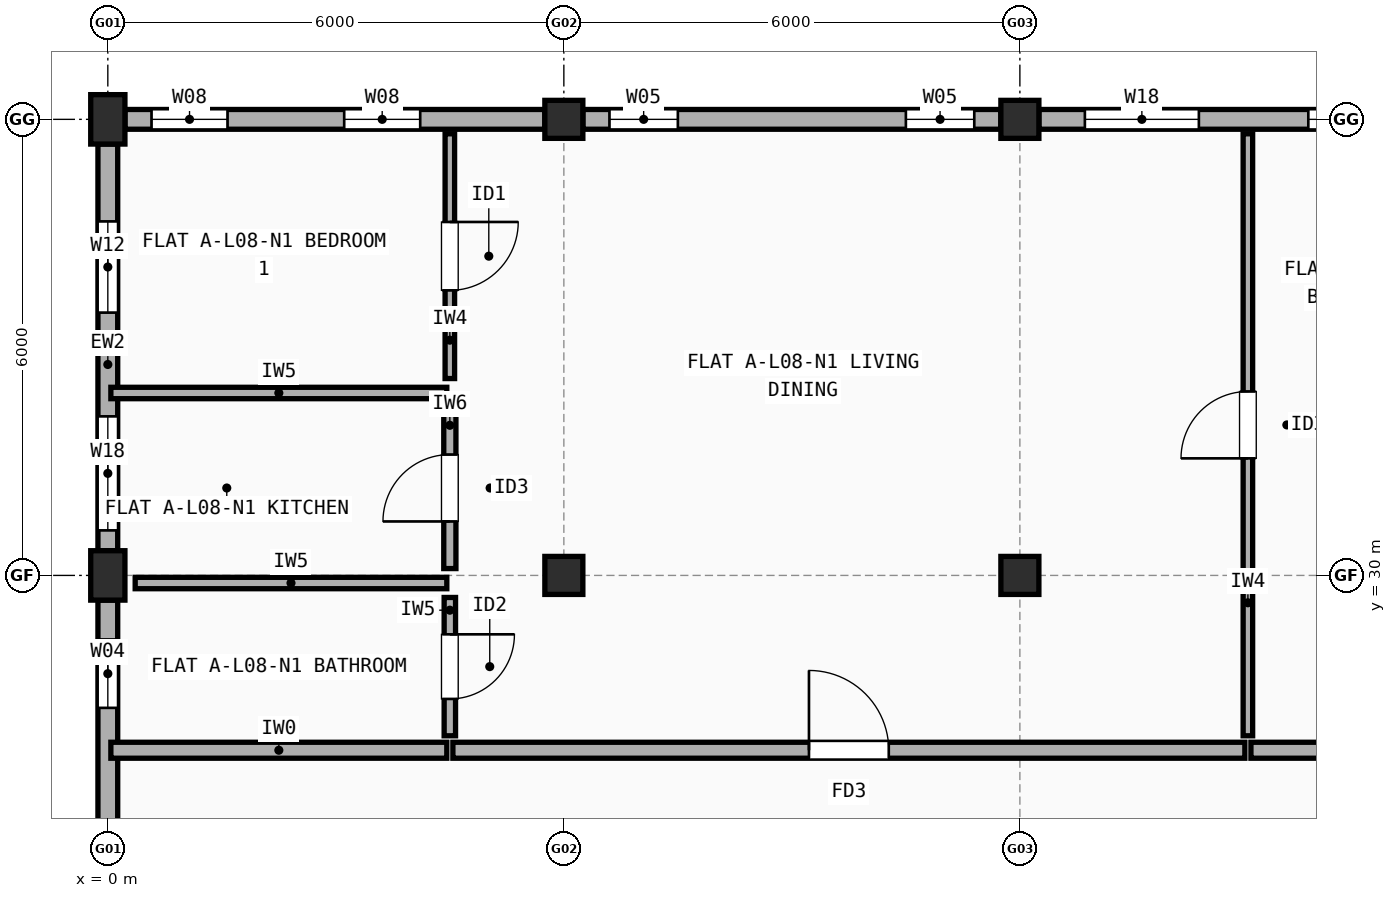
"""IFC4 building model, lengths in metres.
Left out: names, types, materials, properties, quantities, classifications, styles, units other than length and angle.
Written with IfcOpenShell. Run it as: python <this file> out.ifc"""

import sys

from ifc_helpers import new_model, si_unit, direction, frame, frame_2d, origin, origin_2d, place, context, subcontext, project, spatial, rectangle, extrude, element, fill, save


model = new_model("IFC4")
c1 = context("Model", 3, precision=1e-05, world=origin(), true_north=direction((0.0, 1.0)))
c2 = subcontext(c1, "Body", "Model", "MODEL_VIEW")
j1 = project(units=[si_unit("LENGTHUNIT", "METRE"), si_unit("PLANEANGLEUNIT", "RADIAN")], contexts=[c1])
p1 = place(None, origin())
s1 = spatial("IfcSite", under=j1, at=p1, CompositionType="ELEMENT")
p2 = place(p1, origin())
s2 = spatial("IfcBuilding", under=s1, at=p2, CompositionType="ELEMENT")
p3 = place(p2, frame((0.0, 0.0, 26.9)))
s3 = spatial("IfcBuildingStorey", under=s2, at=p3, CompositionType="ELEMENT", Elevation=26.9)
for number, where, z_axis, x_axis in (
    (1, (0.0, 30.0, 0.0), (0.0, 0.0, 1.0), (1.0, 0.0, 0.0)),
    (2, (0.0, 36.0, 0.0), (0.0, 0.0, 1.0), (1.0, 0.0, 0.0)),
):
    element("IfcColumn", number, at=place(p3, frame(where, z_axis=z_axis, x_axis=x_axis)), inside=s3, PredefinedType="COLUMN", context=c2, shape_type="SweptSolid", body=[
        extrude(rectangle(XDim=0.45, YDim=0.65, at=origin_2d()), origin(), (0.0, 0.0, 1.0), 2.98),
    ])
for number, where, z_axis, x_axis in (
    (3, (6.0, 30.0, 0.0), (0.0, 0.0, 1.0), (1.0, 0.0, 0.0)),
    (4, (6.0, 36.0, 0.0), (0.0, 0.0, 1.0), (1.0, 0.0, 0.0)),
    (5, (12.0, 30.0, 0.0), (0.0, 0.0, 1.0), (1.0, 0.0, 0.0)),
    (6, (12.0, 36.0, 0.0), (0.0, 0.0, 1.0), (1.0, 0.0, 0.0)),
):
    element("IfcColumn", number, at=place(p3, frame(where, z_axis=z_axis, x_axis=x_axis)), inside=s3, PredefinedType="COLUMN", context=c2, shape_type="SweptSolid", body=[
        extrude(rectangle(XDim=0.5, YDim=0.5, at=origin_2d()), origin(), (0.0, 0.0, 1.0), 2.98),
    ])
p4 = place(p3, frame((17.75, 36.0, 0.0), z_axis=(0.0, 0.0, 1.0), x_axis=(-1.0, 0.0, 0.0)))
e7 = element("IfcWall", 7, at=p4, inside=s3, PredefinedType="STANDARD", context=c2, shape_type="SweptSolid", body=[
    extrude(rectangle(XDim=5.5, YDim=0.26, at=frame_2d((2.75, 0.0))), origin(), (0.0, 0.0, 1.0), 2.462),
])
p5 = place(p4, frame((0.755, 0.0, 0.9)))
e8 = element("IfcOpeningElement", 8, at=p5, cuts=e7, PredefinedType="OPENING", context=c2, shape_type="SweptSolid", body=[
    extrude(rectangle(XDim=1.2, YDim=1.35, at=frame_2d((0.6, 0.675))), frame((0.0, 0.14, 0.0), z_axis=(0.0, -1.0, 0.0), x_axis=(1.0, 0.0, 0.0)), (0.0, 0.0, 1.0), 0.28),
])
p6 = place(p4, frame((3.395, 0.0, 0.9)))
e9 = element("IfcOpeningElement", 9, at=p6, cuts=e7, PredefinedType="OPENING", context=c2, shape_type="SweptSolid", body=[
    extrude(rectangle(XDim=1.5, YDim=1.4, at=frame_2d((0.75, 0.7))), frame((0.0, 0.14, 0.0), z_axis=(0.0, -1.0, 0.0), x_axis=(1.0, 0.0, 0.0)), (0.0, 0.0, 1.0), 0.28),
])
p7 = place(p3, frame((11.75, 36.0, 0.0), z_axis=(0.0, 0.0, 1.0), x_axis=(-1.0, 0.0, 0.0)))
e10 = element("IfcWall", 10, at=p7, inside=s3, PredefinedType="STANDARD", context=c2, shape_type="SweptSolid", body=[
    extrude(rectangle(XDim=5.5, YDim=0.26, at=frame_2d((2.75, 0.0))), origin(), (0.0, 0.0, 1.0), 2.462),
])
p8 = place(p7, frame((0.35, 0.0, 0.9)))
e11 = element("IfcOpeningElement", 11, at=p8, cuts=e10, PredefinedType="OPENING", context=c2, shape_type="SweptSolid", body=[
    extrude(rectangle(XDim=0.9, YDim=1.4, at=frame_2d((0.45, 0.7))), frame((0.0, 0.14, 0.0), z_axis=(0.0, -1.0, 0.0), x_axis=(1.0, 0.0, 0.0)), (0.0, 0.0, 1.0), 0.28),
])
p9 = place(p7, frame((4.25, 0.0, 0.9)))
e12 = element("IfcOpeningElement", 12, at=p9, cuts=e10, PredefinedType="OPENING", context=c2, shape_type="SweptSolid", body=[
    extrude(rectangle(XDim=0.9, YDim=1.4, at=frame_2d((0.45, 0.7))), frame((0.0, 0.14, 0.0), z_axis=(0.0, -1.0, 0.0), x_axis=(1.0, 0.0, 0.0)), (0.0, 0.0, 1.0), 0.28),
])
p10 = place(p3, frame((5.75, 36.0, 0.0), z_axis=(0.0, 0.0, 1.0), x_axis=(-1.0, 0.0, 0.0)))
e13 = element("IfcWall", 13, at=p10, inside=s3, PredefinedType="STANDARD", context=c2, shape_type="SweptSolid", body=[
    extrude(rectangle(XDim=5.525, YDim=0.26, at=frame_2d((2.762, 0.0))), origin(), (0.0, 0.0, 1.0), 2.462),
])
p11 = place(p10, frame((1.64, 0.0, 0.9)))
e14 = element("IfcOpeningElement", 14, at=p11, cuts=e13, PredefinedType="OPENING", context=c2, shape_type="SweptSolid", body=[
    extrude(rectangle(XDim=1.0, YDim=1.4, at=frame_2d((0.5, 0.7))), frame((0.0, 0.14, 0.0), z_axis=(0.0, -1.0, 0.0), x_axis=(1.0, 0.0, 0.0)), (0.0, 0.0, 1.0), 0.28),
])
p12 = place(p10, frame((4.175, 0.0, 0.9)))
e15 = element("IfcOpeningElement", 15, at=p12, cuts=e13, PredefinedType="OPENING", context=c2, shape_type="SweptSolid", body=[
    extrude(rectangle(XDim=1.0, YDim=1.4, at=frame_2d((0.5, 0.7))), frame((0.0, 0.14, 0.0), z_axis=(0.0, -1.0, 0.0), x_axis=(1.0, 0.0, 0.0)), (0.0, 0.0, 1.0), 0.28),
])
p13 = place(p3, frame((0.0, 35.675, 0.0), z_axis=(0.0, 0.0, 1.0), x_axis=(0.0, -1.0, 0.0)))
e16 = element("IfcWall", 16, at=p13, inside=s3, PredefinedType="STANDARD", context=c2, shape_type="SweptSolid", body=[
    extrude(rectangle(XDim=5.35, YDim=0.26, at=frame_2d((2.675, 0.0))), origin(), (0.0, 0.0, 1.0), 2.462),
])
p14 = place(p13, frame((1.018, 0.0, 0.9)))
e17 = element("IfcOpeningElement", 17, at=p14, cuts=e16, PredefinedType="OPENING", context=c2, shape_type="SweptSolid", body=[
    extrude(rectangle(XDim=1.2, YDim=1.35, at=frame_2d((0.6, 0.675))), frame((0.0, 0.14, 0.0), z_axis=(0.0, -1.0, 0.0), x_axis=(1.0, 0.0, 0.0)), (0.0, 0.0, 1.0), 0.28),
])
p15 = place(p13, frame((3.583, 0.0, 0.9)))
e18 = element("IfcOpeningElement", 18, at=p15, cuts=e16, PredefinedType="OPENING", context=c2, shape_type="SweptSolid", body=[
    extrude(rectangle(XDim=1.5, YDim=1.4, at=frame_2d((0.75, 0.7))), frame((0.0, 0.14, 0.0), z_axis=(0.0, -1.0, 0.0), x_axis=(1.0, 0.0, 0.0)), (0.0, 0.0, 1.0), 0.28),
])
p16 = place(p3, frame((0.0, 29.675, 0.0), z_axis=(0.0, 0.0, 1.0), x_axis=(0.0, -1.0, 0.0)))
e19 = element("IfcWall", 19, at=p16, inside=s3, PredefinedType="STANDARD", context=c2, shape_type="SweptSolid", body=[
    extrude(rectangle(XDim=5.35, YDim=0.26, at=frame_2d((2.675, 0.0))), origin(), (0.0, 0.0, 1.0), 2.462),
])
p17 = place(p16, frame((0.518, 0.0, 0.9)))
e20 = element("IfcOpeningElement", 20, at=p17, cuts=e19, PredefinedType="OPENING", context=c2, shape_type="SweptSolid", body=[
    extrude(rectangle(XDim=0.9, YDim=1.3, at=frame_2d((0.45, 0.65))), frame((0.0, 0.14, 0.0), z_axis=(0.0, -1.0, 0.0), x_axis=(1.0, 0.0, 0.0)), (0.0, 0.0, 1.0), 0.28),
])
p18 = place(p16, frame((3.208, 0.0, 0.9)))
e21 = element("IfcOpeningElement", 21, at=p18, cuts=e19, PredefinedType="OPENING", context=c2, shape_type="SweptSolid", body=[
    extrude(rectangle(XDim=0.95, YDim=1.35, at=frame_2d((0.475, 0.675))), frame((0.0, 0.14, 0.0), z_axis=(0.0, -1.0, 0.0), x_axis=(1.0, 0.0, 0.0)), (0.0, 0.0, 1.0), 0.28),
])
p19 = place(p3, frame((0.04, 27.7, 0.0), z_axis=(0.0, 0.0, 1.0), x_axis=(1.0, 0.0, 0.0)))
e22 = element("IfcWall", 22, at=p19, inside=s3, PredefinedType="SOLIDWALL", context=c2, shape_type="SweptSolid", body=[
    extrude(rectangle(XDim=4.42, YDim=0.21, at=frame_2d((2.21, 0.0))), origin(), (0.0, 0.0, 1.0), 2.462),
])
p20 = place(p3, frame((4.54, 27.7, 0.0), z_axis=(0.0, 0.0, 1.0), x_axis=(1.0, 0.0, 0.0)))
e23 = element("IfcWall", 23, at=p20, inside=s3, PredefinedType="SOLIDWALL", context=c2, shape_type="SweptSolid", body=[
    extrude(rectangle(XDim=10.42, YDim=0.21, at=frame_2d((5.21, 0.0))), origin(), (0.0, 0.0, 1.0), 2.508),
])
p21 = place(p20, frame((4.685, 0.0, 0.0)))
e24 = element("IfcOpeningElement", 24, at=p21, cuts=e23, PredefinedType="OPENING", context=c2, shape_type="SweptSolid", body=[
    extrude(rectangle(XDim=1.05, YDim=2.15, at=frame_2d((0.525, 1.075))), frame((0.0, 0.115, 0.0), z_axis=(0.0, -1.0, 0.0), x_axis=(1.0, 0.0, 0.0)), (0.0, 0.0, 1.0), 0.23),
])
p22 = place(p3, frame((4.5, 32.59, 0.0), z_axis=(0.0, 0.0, 1.0), x_axis=(0.0, 1.0, 0.0)))
e25 = element("IfcWall", 25, at=p22, inside=s3, PredefinedType="PARTITIONING", context=c2, shape_type="SweptSolid", body=[
    extrude(rectangle(XDim=3.22, YDim=0.125, at=frame_2d((1.61, 0.0))), origin(), (0.0, 0.0, 1.0), 2.98),
])
p23 = place(p22, frame((1.16, 0.0, 0.0)))
e26 = element("IfcOpeningElement", 26, at=p23, cuts=e25, PredefinedType="OPENING", context=c2, shape_type="SweptSolid", body=[
    extrude(rectangle(XDim=0.9, YDim=2.1, at=frame_2d((0.45, 1.05))), frame((0.0, 0.073, 0.0), z_axis=(0.0, -1.0, 0.0), x_axis=(1.0, 0.0, 0.0)), (0.0, 0.0, 1.0), 0.145),
])
p24 = place(p3, frame((4.5, 30.09, 0.0), z_axis=(0.0, 0.0, 1.0), x_axis=(0.0, 1.0, 0.0)))
e27 = element("IfcWall", 27, at=p24, inside=s3, PredefinedType="PLUMBINGWALL", context=c2, shape_type="SweptSolid", body=[
    extrude(rectangle(XDim=2.12, YDim=0.16, at=frame_2d((1.06, 0.0))), origin(), (0.0, 0.0, 1.0), 2.462),
])
p25 = place(p24, frame((0.62, 0.0, 0.0)))
e28 = element("IfcOpeningElement", 28, at=p25, cuts=e27, PredefinedType="OPENING", context=c2, shape_type="SweptSolid", body=[
    extrude(rectangle(XDim=0.88, YDim=2.1, at=frame_2d((0.44, 1.05))), frame((0.0, 0.09, 0.0), z_axis=(0.0, -1.0, 0.0), x_axis=(1.0, 0.0, 0.0)), (0.0, 0.0, 1.0), 0.18),
])
p26 = place(p3, frame((4.5, 27.89, 0.0), z_axis=(0.0, 0.0, 1.0), x_axis=(0.0, 1.0, 0.0)))
e29 = element("IfcWall", 29, at=p26, inside=s3, PredefinedType="PARTITIONING", context=c2, shape_type="SweptSolid", body=[
    extrude(rectangle(XDim=1.82, YDim=0.15, at=frame_2d((0.91, 0.0))), origin(), (0.0, 0.0, 1.0), 2.98),
])
p27 = place(p26, frame((0.485, 0.0, 0.0)))
e30 = element("IfcOpeningElement", 30, at=p27, cuts=e29, PredefinedType="OPENING", context=c2, shape_type="SweptSolid", body=[
    extrude(rectangle(XDim=0.85, YDim=2.1, at=frame_2d((0.425, 1.05))), frame((0.0, 0.085, 0.0), z_axis=(0.0, -1.0, 0.0), x_axis=(1.0, 0.0, 0.0)), (0.0, 0.0, 1.0), 0.17),
])
p28 = place(p3, frame((0.04, 32.4, 0.0), z_axis=(0.0, 0.0, 1.0), x_axis=(1.0, 0.0, 0.0)))
e31 = element("IfcWall", 31, at=p28, inside=s3, PredefinedType="PARTITIONING", context=c2, shape_type="SweptSolid", body=[
    extrude(rectangle(XDim=4.42, YDim=0.15, at=frame_2d((2.21, 0.0))), origin(), (0.0, 0.0, 1.0), 2.462),
])
p29 = place(p3, frame((0.36, 29.9, 0.0), z_axis=(0.0, 0.0, 1.0), x_axis=(1.0, 0.0, 0.0)))
e32 = element("IfcWall", 32, at=p29, inside=s3, PredefinedType="PARTITIONING", context=c2, shape_type="SweptSolid", body=[
    extrude(rectangle(XDim=4.1, YDim=0.15, at=frame_2d((2.05, 0.0))), origin(), (0.0, 0.0, 1.0), 2.462),
])
p30 = place(p3, frame((15.04, 27.7, 0.0), z_axis=(0.0, 0.0, 1.0), x_axis=(1.0, 0.0, 0.0)))
e33 = element("IfcWall", 33, at=p30, inside=s3, PredefinedType="SOLIDWALL", context=c2, shape_type="SweptSolid", body=[
    extrude(rectangle(XDim=2.92, YDim=0.21, at=frame_2d((1.46, 0.0))), origin(), (0.0, 0.0, 1.0), 2.98),
])
p31 = place(p3, frame((15.0, 27.89, 0.0), z_axis=(0.0, 0.0, 1.0), x_axis=(0.0, 1.0, 0.0)))
e34 = element("IfcWall", 34, at=p31, inside=s3, PredefinedType="PARTITIONING", context=c2, shape_type="SweptSolid", body=[
    extrude(rectangle(XDim=7.92, YDim=0.125, at=frame_2d((3.96, 0.0))), origin(), (0.0, 0.0, 1.0), 2.462),
])
p32 = place(p31, frame((3.65, 0.0, 0.0)))
e35 = element("IfcOpeningElement", 35, at=p32, cuts=e34, PredefinedType="OPENING", context=c2, shape_type="SweptSolid", body=[
    extrude(rectangle(XDim=0.88, YDim=2.1, at=frame_2d((0.44, 1.05))), frame((0.0, 0.073, 0.0), z_axis=(0.0, -1.0, 0.0), x_axis=(1.0, 0.0, 0.0)), (0.0, 0.0, 1.0), 0.145),
])
p33 = place(p5, origin())
e36 = element("IfcWindow", 36, at=p33, inside=s3, PartitioningType="SINGLE_PANEL", PredefinedType="WINDOW", context=c2, shape_type="SweptSolid", body=[
    extrude(rectangle(XDim=1.2, YDim=1.35, at=frame_2d((0.6, 0.675))), frame((0.0, 0.03, 0.0), z_axis=(0.0, -1.0, 0.0), x_axis=(1.0, 0.0, 0.0)), (0.0, 0.0, 1.0), 0.06),
])
fill(e8, e36)
p34 = place(p6, origin())
e37 = element("IfcWindow", 37, at=p34, inside=s3, PartitioningType="SINGLE_PANEL", PredefinedType="WINDOW", context=c2, shape_type="SweptSolid", body=[
    extrude(rectangle(XDim=1.5, YDim=1.4, at=frame_2d((0.75, 0.7))), frame((0.0, 0.03, 0.0), z_axis=(0.0, -1.0, 0.0), x_axis=(1.0, 0.0, 0.0)), (0.0, 0.0, 1.0), 0.06),
])
fill(e9, e37)
p35 = place(p8, origin())
e38 = element("IfcWindow", 38, at=p35, inside=s3, PartitioningType="SINGLE_PANEL", PredefinedType="WINDOW", context=c2, shape_type="SweptSolid", body=[
    extrude(rectangle(XDim=0.9, YDim=1.4, at=frame_2d((0.45, 0.7))), frame((0.0, 0.03, 0.0), z_axis=(0.0, -1.0, 0.0), x_axis=(1.0, 0.0, 0.0)), (0.0, 0.0, 1.0), 0.06),
])
fill(e11, e38)
p36 = place(p9, origin())
e39 = element("IfcWindow", 39, at=p36, inside=s3, PartitioningType="SINGLE_PANEL", PredefinedType="WINDOW", context=c2, shape_type="SweptSolid", body=[
    extrude(rectangle(XDim=0.9, YDim=1.4, at=frame_2d((0.45, 0.7))), frame((0.0, 0.03, 0.0), z_axis=(0.0, -1.0, 0.0), x_axis=(1.0, 0.0, 0.0)), (0.0, 0.0, 1.0), 0.06),
])
fill(e12, e39)
p37 = place(p11, origin())
e40 = element("IfcWindow", 40, at=p37, inside=s3, PartitioningType="SINGLE_PANEL", PredefinedType="WINDOW", context=c2, shape_type="SweptSolid", body=[
    extrude(rectangle(XDim=1.0, YDim=1.4, at=frame_2d((0.5, 0.7))), frame((0.0, 0.03, 0.0), z_axis=(0.0, -1.0, 0.0), x_axis=(1.0, 0.0, 0.0)), (0.0, 0.0, 1.0), 0.06),
])
fill(e14, e40)
p38 = place(p12, origin())
e41 = element("IfcWindow", 41, at=p38, inside=s3, PartitioningType="SINGLE_PANEL", PredefinedType="WINDOW", context=c2, shape_type="SweptSolid", body=[
    extrude(rectangle(XDim=1.0, YDim=1.4, at=frame_2d((0.5, 0.7))), frame((0.0, 0.03, 0.0), z_axis=(0.0, -1.0, 0.0), x_axis=(1.0, 0.0, 0.0)), (0.0, 0.0, 1.0), 0.06),
])
fill(e15, e41)
p39 = place(p14, origin())
e42 = element("IfcWindow", 42, at=p39, inside=s3, PartitioningType="SINGLE_PANEL", PredefinedType="WINDOW", context=c2, shape_type="SweptSolid", body=[
    extrude(rectangle(XDim=1.2, YDim=1.35, at=frame_2d((0.6, 0.675))), frame((0.0, 0.03, 0.0), z_axis=(0.0, -1.0, 0.0), x_axis=(1.0, 0.0, 0.0)), (0.0, 0.0, 1.0), 0.06),
])
fill(e17, e42)
p40 = place(p15, origin())
e43 = element("IfcWindow", 43, at=p40, inside=s3, PartitioningType="SINGLE_PANEL", PredefinedType="WINDOW", context=c2, shape_type="SweptSolid", body=[
    extrude(rectangle(XDim=1.5, YDim=1.4, at=frame_2d((0.75, 0.7))), frame((0.0, 0.03, 0.0), z_axis=(0.0, -1.0, 0.0), x_axis=(1.0, 0.0, 0.0)), (0.0, 0.0, 1.0), 0.06),
])
fill(e18, e43)
p41 = place(p17, origin())
e44 = element("IfcWindow", 44, at=p41, inside=s3, PartitioningType="SINGLE_PANEL", PredefinedType="WINDOW", context=c2, shape_type="SweptSolid", body=[
    extrude(rectangle(XDim=0.9, YDim=1.3, at=frame_2d((0.45, 0.65))), frame((0.0, 0.03, 0.0), z_axis=(0.0, -1.0, 0.0), x_axis=(1.0, 0.0, 0.0)), (0.0, 0.0, 1.0), 0.06),
])
fill(e20, e44)
p42 = place(p21, origin())
e45 = element("IfcDoor", 45, at=p42, inside=s3, OperationType="SINGLE_SWING_LEFT", PredefinedType="DOOR", context=c2, shape_type="SweptSolid", body=[
    extrude(rectangle(XDim=1.05, YDim=2.15, at=frame_2d((0.525, 1.075))), frame((0.0, 0.025, 0.0), z_axis=(0.0, -1.0, 0.0), x_axis=(1.0, 0.0, 0.0)), (0.0, 0.0, 1.0), 0.05),
])
fill(e24, e45)
p43 = place(p23, origin())
e46 = element("IfcDoor", 46, at=p43, inside=s3, OperationType="SINGLE_SWING_RIGHT", PredefinedType="DOOR", context=c2, shape_type="SweptSolid", body=[
    extrude(rectangle(XDim=0.9, YDim=2.1, at=frame_2d((0.45, 1.05))), frame((0.0, 0.025, 0.0), z_axis=(0.0, -1.0, 0.0), x_axis=(1.0, 0.0, 0.0)), (0.0, 0.0, 1.0), 0.05),
])
fill(e26, e46)
p44 = place(p25, origin())
e47 = element("IfcDoor", 47, at=p44, inside=s3, OperationType="SINGLE_SWING_LEFT", PredefinedType="DOOR", context=c2, shape_type="SweptSolid", body=[
    extrude(rectangle(XDim=0.88, YDim=2.1, at=frame_2d((0.44, 1.05))), frame((0.0, 0.025, 0.0), z_axis=(0.0, -1.0, 0.0), x_axis=(1.0, 0.0, 0.0)), (0.0, 0.0, 1.0), 0.05),
])
fill(e28, e47)
p45 = place(p27, origin())
e48 = element("IfcDoor", 48, at=p45, inside=s3, OperationType="SINGLE_SWING_RIGHT", PredefinedType="DOOR", context=c2, shape_type="SweptSolid", body=[
    extrude(rectangle(XDim=0.85, YDim=2.1, at=frame_2d((0.425, 1.05))), frame((0.0, 0.025, 0.0), z_axis=(0.0, -1.0, 0.0), x_axis=(1.0, 0.0, 0.0)), (0.0, 0.0, 1.0), 0.05),
])
fill(e30, e48)
p46 = place(p32, origin())
e49 = element("IfcDoor", 49, at=p46, inside=s3, OperationType="SINGLE_SWING_LEFT", PredefinedType="DOOR", context=c2, shape_type="SweptSolid", body=[
    extrude(rectangle(XDim=0.88, YDim=2.1, at=frame_2d((0.44, 1.05))), frame((0.0, 0.025, 0.0), z_axis=(0.0, -1.0, 0.0), x_axis=(1.0, 0.0, 0.0)), (0.0, 0.0, 1.0), 0.05),
])
fill(e35, e49)
save(model, sys.argv[1])
